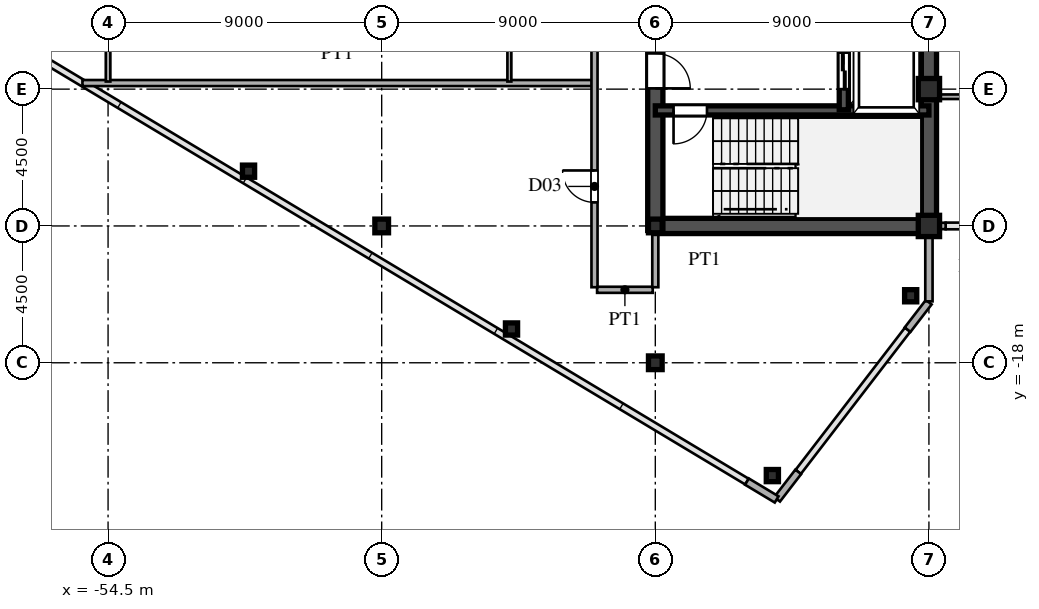
"""IFC4 building model, lengths in metres.
Left out: names, types, materials, properties, quantities, classifications, styles, units other than length and angle.
Written with IfcOpenShell. Run it as: python <this file> out.ifc"""

import sys

from ifc_helpers import new_model, si_unit, direction, frame, frame_2d, origin, origin_2d, place, context, subcontext, project, spatial, rectangle, hollow_rectangle, i_section, extrude, source, transform, mapped, element, fill, save


model = new_model("IFC4")
c1 = context("Model", 3, precision=1e-05, world=origin(), true_north=direction((0.0, 1.0)))
c2 = subcontext(c1, "Body", "Model", "MODEL_VIEW")
j1 = project(units=[si_unit("LENGTHUNIT", "METRE"), si_unit("PLANEANGLEUNIT", "RADIAN")], contexts=[c1])
p1 = place(None, origin())
s1 = spatial("IfcSite", under=j1, at=p1, CompositionType="ELEMENT")
p2 = place(p1, origin())
s2 = spatial("IfcBuilding", under=s1, at=p2, CompositionType="ELEMENT")
p3 = place(p2, frame((0.0, 0.0, 243.15)))
s3 = spatial("IfcBuildingStorey", under=s2, at=p3, CompositionType="ELEMENT", Elevation=243.15)
m1 = source(origin(), c2, "Body", "SweptSolid", [
    extrude(hollow_rectangle(XDim=0.7, YDim=0.7, WallThickness=0.03, at=origin_2d()), origin(), (0.0, 0.0, 1.0), 3.75),
])
for number, where, z_axis, x_axis in (
    (1, (-27.5, -13.5, 0.0), (0.0, 0.0, 1.0), (1.0, 0.0, 0.0)),
    (2, (-27.5, -9.0, 0.0), (0.0, 0.0, 1.0), (1.0, 0.0, 0.0)),
):
    element("IfcColumn", number, at=place(p3, frame(where, z_axis=z_axis, x_axis=x_axis)), inside=s3, PredefinedType="COLUMN", context=c2, shape_type="MappedRepresentation", body=[
        mapped(m1, transform((0.0, 0.0, 0.0), scale=1.0)),
    ])
m2 = source(origin(), c2, "Body", "SweptSolid", [
    extrude(i_section(OverallWidth=0.45, OverallDepth=0.45, WebThickness=0.016, FlangeThickness=0.025, at=origin_2d()), origin(), (0.0, 0.0, 1.0), 3.75),
])
for number, where, z_axis, x_axis in (
    (3, (-36.5, -18.0, 0.0), (0.0, 0.0, 1.0), (1.0, 0.0, 0.0)),
    (4, (-36.5, -13.5, 0.0), (0.0, 0.0, 1.0), (1.0, 0.0, 0.0)),
    (5, (-45.5, -13.5, 0.0), (0.0, 0.0, 1.0), (1.0, 0.0, 0.0)),
):
    element("IfcColumn", number, at=place(p3, frame(where, z_axis=z_axis, x_axis=x_axis)), inside=s3, PredefinedType="COLUMN", context=c2, shape_type="MappedRepresentation", body=[
        mapped(m2, transform((0.0, 0.0, 0.0), scale=1.0)),
    ])
m3 = source(origin(), c2, "Body", "SweptSolid", [
    extrude(hollow_rectangle(XDim=0.4, YDim=0.4, WallThickness=0.016, at=origin_2d()), origin(), (0.0, 0.0, 1.0), 3.75),
])
for number, where, z_axis, x_axis in (
    (6, (-28.1, -15.796, 0.0), (0.0, 0.0, 1.0), (1.0, 0.0, 0.0)),
    (7, (-32.65, -21.71, 0.0), (0.0, 0.0, 1.0), (1.0, 0.0, 0.0)),
    (8, (-41.23, -16.889, 0.0), (0.0, 0.0, 1.0), (1.0, 0.0, 0.0)),
    (9, (-49.88, -11.699, 0.0), (0.0, 0.0, 1.0), (1.0, 0.0, 0.0)),
):
    element("IfcColumn", number, at=place(p3, frame(where, z_axis=z_axis, x_axis=x_axis)), inside=s3, PredefinedType="COLUMN", context=c2, shape_type="MappedRepresentation", body=[
        mapped(m3, transform((0.0, 0.0, 0.0), scale=1.0)),
    ])
p4 = place(p3, frame((-27.5, -15.98, 0.0), z_axis=(0.0, 0.0, 1.0), x_axis=(0.0, 1.0, 0.0)))
e10 = element("IfcWall", 10, at=p4, inside=s3, PredefinedType="SOLIDWALL", context=c2, shape_type="SweptSolid", body=[
    extrude(rectangle(XDim=1.605, YDim=0.24, at=frame_2d((0.803, 0.0))), origin(), (0.0, 0.0, 1.0), 3.53),
])
p5 = place(p3, frame((-27.5, -14.375, 0.0), z_axis=(0.0, 0.0, 1.0), x_axis=(0.0, 1.0, 0.0)))
e11 = element("IfcWall", 11, at=p5, inside=s3, PredefinedType="SOLIDWALL", context=c2, shape_type="SweptSolid", body=[
    extrude(rectangle(XDim=0.62, YDim=0.24, at=frame_2d((0.31, 0.0))), origin(), (0.0, 0.0, 1.0), 3.03),
])
for number, where, z_axis, x_axis in (
    (12, (-33.486, -21.908, 0.0), (0.0, 0.0, 1.0), (0.857, -0.515, 0.0)),
    (13, (-32.494, -22.492, 0.0), (0.0, 0.0, 1.0), (0.61, 0.793, 0.0)),
    (14, (-28.201, -16.912, 0.0), (0.0, 0.0, 1.0), (0.61, 0.793, 0.0)),
):
    element("IfcWall", number, at=place(p3, frame(where, z_axis=z_axis, x_axis=x_axis)), inside=s3, PredefinedType="SOLIDWALL", context=c2, shape_type="SweptSolid", body=[
        extrude(rectangle(XDim=1.14, YDim=0.24, at=frame_2d((0.57, 0.0))), origin(), (0.0, 0.0, 1.0), 3.53),
    ])
p6 = place(p3, frame((-27.49, -13.5, 0.0), z_axis=(0.0, 0.0, 1.0), x_axis=(1.0, 0.0, 0.0)))
e15 = element("IfcWall", 15, at=p6, inside=s3, PredefinedType="SOLIDWALL", context=c2, shape_type="SweptSolid", body=[
    extrude(rectangle(XDim=0.54, YDim=0.21, at=frame_2d((0.27, 0.0))), origin(), (0.0, 0.0, 1.0), 3.03),
])
p7 = place(p3, frame((-27.5, -13.5, 0.0), z_axis=(0.0, 0.0, 1.0), x_axis=(0.0, 1.0, 0.0)))
e16 = element("IfcWall", 16, at=p7, inside=s3, PredefinedType="SHEAR", context=c2, shape_type="SweptSolid", body=[
    extrude(rectangle(XDim=12.2, YDim=0.5, at=frame_2d((6.1, 0.0))), origin(), (0.0, 0.0, 1.0), 3.53),
])
p8 = place(p3, frame((-36.5, -13.5, 0.0), z_axis=(0.0, 0.0, 1.0), x_axis=(1.0, 0.0, 0.0)))
e17 = element("IfcWall", 17, at=p8, inside=s3, PredefinedType="SHEAR", context=c2, shape_type="SweptSolid", body=[
    extrude(rectangle(XDim=9.0, YDim=0.5, at=frame_2d((4.5, 0.0))), origin(), (0.0, 0.0, 1.0), 3.53),
])
p9 = place(p3, frame((-36.5, -13.65, 0.0), z_axis=(0.0, 0.0, 1.0), x_axis=(0.0, 1.0, 0.0)))
e18 = element("IfcWall", 18, at=p9, inside=s3, PredefinedType="SHEAR", context=c2, shape_type="SweptSolid", body=[
    extrude(rectangle(XDim=7.15, YDim=0.5, at=frame_2d((3.575, 0.0))), origin(), (0.0, 0.0, 1.0), 3.53),
])
p10 = place(p9, frame((4.675, 0.0, 0.0)))
e19 = element("IfcOpeningElement", 19, at=p10, cuts=e18, PredefinedType="OPENING", context=c2, shape_type="SweptSolid", body=[
    extrude(rectangle(XDim=1.15, YDim=2.2, at=frame_2d((0.575, 1.1))), frame((0.0, 0.26, 0.0), z_axis=(0.0, -1.0, 0.0), x_axis=(1.0, 0.0, 0.0)), (0.0, 0.0, 1.0), 0.52),
])
p11 = place(p3, frame((-36.5, -9.7, 0.0), z_axis=(0.0, 0.0, 1.0), x_axis=(1.0, 0.0, 0.0)))
e20 = element("IfcWall", 20, at=p11, inside=s3, PredefinedType="SHEAR", context=c2, shape_type="SweptSolid", body=[
    extrude(rectangle(XDim=9.0, YDim=0.3, at=frame_2d((4.5, 0.0))), origin(), (0.0, 0.0, 1.0), 3.53),
])
p12 = place(p11, frame((0.6, 0.0, 0.0)))
e21 = element("IfcOpeningElement", 21, at=p12, cuts=e20, PredefinedType="OPENING", context=c2, shape_type="SweptSolid", body=[
    extrude(rectangle(XDim=1.1, YDim=2.2, at=frame_2d((0.55, 1.1))), frame((0.0, 0.16, 0.0), z_axis=(0.0, -1.0, 0.0), x_axis=(1.0, 0.0, 0.0)), (0.0, 0.0, 1.0), 0.32),
])
p13 = place(p3, frame((-30.3, -9.68, 0.0), z_axis=(0.0, 0.0, 1.0), x_axis=(0.0, 1.0, 0.0)))
e22 = element("IfcWall", 22, at=p13, inside=s3, PredefinedType="SHEAR", context=c2, shape_type="SweptSolid", body=[
    extrude(rectangle(XDim=2.56, YDim=0.3, at=frame_2d((1.28, 0.0))), origin(), (0.0, 0.0, 1.0), 3.53),
])
p14 = place(p13, frame((0.68, 0.0, 0.0)))
e23 = element("IfcOpeningElement", 23, at=p14, cuts=e22, PredefinedType="OPENING", context=c2, shape_type="SweptSolid", body=[
    extrude(rectangle(XDim=1.2, YDim=2.25, at=frame_2d((0.6, 1.125))), frame((0.0, 0.16, 0.0), z_axis=(0.0, -1.0, 0.0), x_axis=(1.0, 0.0, 0.0)), (0.0, 0.0, 1.0), 0.32),
])
p15 = place(p3, frame((-38.415, -15.6, 0.0), z_axis=(0.0, 0.0, 1.0), x_axis=(1.0, 0.0, 0.0)))
e24 = element("IfcWall", 24, at=p15, inside=s3, PredefinedType="PARTITIONING", context=c2, shape_type="SweptSolid", body=[
    extrude(rectangle(XDim=1.83, YDim=0.2, at=frame_2d((0.915, 0.0))), origin(), (0.0, 0.0, 1.0), 3.53),
])
p16 = place(p3, frame((-27.245, -9.25, 0.0), z_axis=(0.0, 0.0, 1.0), x_axis=(1.0, 0.0, 0.0)))
e25 = element("IfcWall", 25, at=p16, inside=s3, PredefinedType="PARTITIONING", context=c2, shape_type="SweptSolid", body=[
    extrude(rectangle(XDim=6.66, YDim=0.15, at=frame_2d((3.33, 0.0))), origin(), (0.0, 0.0, 1.0), 3.53),
])
p17 = place(p16, frame((3.07, 0.0, 0.0)))
e26 = element("IfcOpeningElement", 26, at=p17, cuts=e25, PredefinedType="OPENING", context=c2, shape_type="SweptSolid", body=[
    extrude(rectangle(XDim=0.95, YDim=2.15, at=frame_2d((0.475, 1.075))), frame((0.0, 0.085, 0.0), z_axis=(0.0, -1.0, 0.0), x_axis=(1.0, 0.0, 0.0)), (0.0, 0.0, 1.0), 0.17),
])
p18 = place(p3, frame((-55.343, -8.8, 0.0), z_axis=(0.0, 0.0, 1.0), x_axis=(1.0, 0.0, 0.0)))
e27 = element("IfcWall", 27, at=p18, inside=s3, PredefinedType="PARTITIONING", context=c2, shape_type="SweptSolid", body=[
    extrude(rectangle(XDim=16.763, YDim=0.2, at=frame_2d((8.381, 0.0))), origin(), (0.0, 0.0, 1.0), 3.53),
])
p19 = place(p3, frame((-54.5, -8.75, 0.0), z_axis=(0.0, 0.0, 1.0), x_axis=(0.0, 1.0, 0.0)))
e28 = element("IfcWall", 28, at=p19, inside=s3, PredefinedType="PARTITIONING", context=c2, shape_type="SweptSolid", body=[
    extrude(rectangle(XDim=12.3, YDim=0.15, at=frame_2d((6.15, 0.0))), origin(), (0.0, 0.0, 1.0), 2.93),
])
p20 = place(p19, frame((5.675, 0.0, 0.0)))
e29 = element("IfcOpeningElement", 29, at=p20, cuts=e28, PredefinedType="OPENING", context=c2, shape_type="SweptSolid", body=[
    extrude(rectangle(XDim=0.95, YDim=2.15, at=frame_2d((0.475, 1.075))), frame((0.0, 0.085, 0.0), z_axis=(0.0, -1.0, 0.0), x_axis=(1.0, 0.0, 0.0)), (0.0, 0.0, 1.0), 0.17),
])
p21 = place(p3, frame((-41.3, -8.75, 0.0), z_axis=(0.0, 0.0, 1.0), x_axis=(0.0, 1.0, 0.0)))
e30 = element("IfcWall", 30, at=p21, inside=s3, PredefinedType="PARTITIONING", context=c2, shape_type="SweptSolid", body=[
    extrude(rectangle(XDim=3.246, YDim=0.13, at=frame_2d((1.623, 0.0))), origin(), (0.0, 0.0, 1.0), 3.53),
])
p22 = place(p3, frame((-38.5, -15.515, 0.0), z_axis=(0.0, 0.0, 1.0), x_axis=(0.0, 1.0, 0.0)))
e31 = element("IfcWall", 31, at=p22, inside=s3, PredefinedType="PARTITIONING", context=c2, shape_type="SweptSolid", body=[
    extrude(rectangle(XDim=31.03, YDim=0.2, at=frame_2d((15.515, 0.0))), origin(), (0.0, 0.0, 1.0), 3.53),
])
p23 = place(p22, frame((2.79, 0.0, 0.0)))
e32 = element("IfcOpeningElement", 32, at=p23, cuts=e31, PredefinedType="OPENING", context=c2, shape_type="SweptSolid", body=[
    extrude(rectangle(XDim=1.05, YDim=2.25, at=frame_2d((0.525, 1.125))), frame((0.0, 0.11, 0.0), z_axis=(0.0, -1.0, 0.0), x_axis=(1.0, 0.0, 0.0)), (0.0, 0.0, 1.0), 0.22),
])
p24 = place(p22, frame((12.204, 0.0, 0.0)))
e33 = element("IfcOpeningElement", 33, at=p24, cuts=e31, PredefinedType="OPENING", context=c2, shape_type="SweptSolid", body=[
    extrude(rectangle(XDim=1.05, YDim=2.25, at=frame_2d((0.525, 1.125))), frame((0.0, 0.11, 0.0), z_axis=(0.0, -1.0, 0.0), x_axis=(1.0, 0.0, 0.0)), (0.0, 0.0, 1.0), 0.22),
])
p25 = place(p22, frame((24.59, 0.0, 0.0)))
e34 = element("IfcOpeningElement", 34, at=p25, cuts=e31, PredefinedType="OPENING", context=c2, shape_type="SweptSolid", body=[
    extrude(rectangle(XDim=1.05, YDim=2.25, at=frame_2d((0.525, 1.125))), frame((0.0, 0.11, 0.0), z_axis=(0.0, -1.0, 0.0), x_axis=(1.0, 0.0, 0.0)), (0.0, 0.0, 1.0), 0.22),
])
p26 = place(p3, frame((-36.5, -15.515, 0.0), z_axis=(0.0, 0.0, 1.0), x_axis=(0.0, 1.0, 0.0)))
e35 = element("IfcWall", 35, at=p26, inside=s3, PredefinedType="PARTITIONING", context=c2, shape_type="SweptSolid", body=[
    extrude(rectangle(XDim=1.76, YDim=0.2, at=frame_2d((0.88, 0.0))), origin(), (0.0, 0.0, 1.0), 2.93),
])
m4 = source(origin(), c2, "Body", "SweptSolid", [
    extrude(rectangle(XDim=1.15, YDim=2.2, at=frame_2d((0.575, 1.1))), frame((0.0, 0.025, 0.0), z_axis=(0.0, -1.0, 0.0), x_axis=(1.0, 0.0, 0.0)), (0.0, 0.0, 1.0), 0.05),
])
p27 = place(p10, frame((1.15, 0.0, 0.0), z_axis=(0.0, 0.0, 1.0), x_axis=(-1.0, 0.0, 0.0)))
e36 = element("IfcDoor", 36, at=p27, inside=s3, OperationType="SINGLE_SWING_LEFT", PredefinedType="DOOR", context=c2, shape_type="MappedRepresentation", body=[
    mapped(m4, transform((0.0, 0.0, 0.0), scale=1.0)),
])
fill(e19, e36)
m5 = source(origin(), c2, "Body", "SweptSolid", [
    extrude(rectangle(XDim=1.1, YDim=2.2, at=frame_2d((0.55, 1.1))), frame((0.0, 0.025, 0.0), z_axis=(0.0, -1.0, 0.0), x_axis=(1.0, 0.0, 0.0)), (0.0, 0.0, 1.0), 0.05),
])
p28 = place(p12, frame((1.1, 0.0, 0.0), z_axis=(0.0, 0.0, 1.0), x_axis=(-1.0, 0.0, 0.0)))
e37 = element("IfcDoor", 37, at=p28, inside=s3, OperationType="SINGLE_SWING_LEFT", PredefinedType="DOOR", context=c2, shape_type="MappedRepresentation", body=[
    mapped(m5, transform((0.0, 0.0, 0.0), scale=1.0)),
])
fill(e21, e37)
m6 = source(origin(), c2, "Body", "SweptSolid", [
    extrude(rectangle(XDim=1.2, YDim=2.25, at=frame_2d((0.6, 1.125))), frame((0.0, 0.025, 0.0), z_axis=(0.0, -1.0, 0.0), x_axis=(1.0, 0.0, 0.0)), (0.0, 0.0, 1.0), 0.05),
])
p29 = place(p14, origin())
e38 = element("IfcDoor", 38, at=p29, inside=s3, OperationType="DOUBLE_DOOR_SLIDING", PredefinedType="DOOR", context=c2, shape_type="MappedRepresentation", body=[
    mapped(m6, transform((0.0, 0.0, 0.0), scale=1.0)),
])
fill(e23, e38)
m7 = source(origin(), c2, "Body", "SweptSolid", [
    extrude(rectangle(XDim=1.05, YDim=2.25, at=frame_2d((0.525, 1.125))), frame((0.0, 0.025, 0.0), z_axis=(0.0, -1.0, 0.0), x_axis=(1.0, 0.0, 0.0)), (0.0, 0.0, 1.0), 0.05),
])
p30 = place(p23, origin())
e39 = element("IfcDoor", 39, at=p30, inside=s3, OperationType="SINGLE_SWING_RIGHT", PredefinedType="DOOR", context=c2, shape_type="MappedRepresentation", body=[
    mapped(m7, transform((0.0, 0.0, 0.0), scale=1.0)),
])
fill(e32, e39)
save(model, sys.argv[1])
